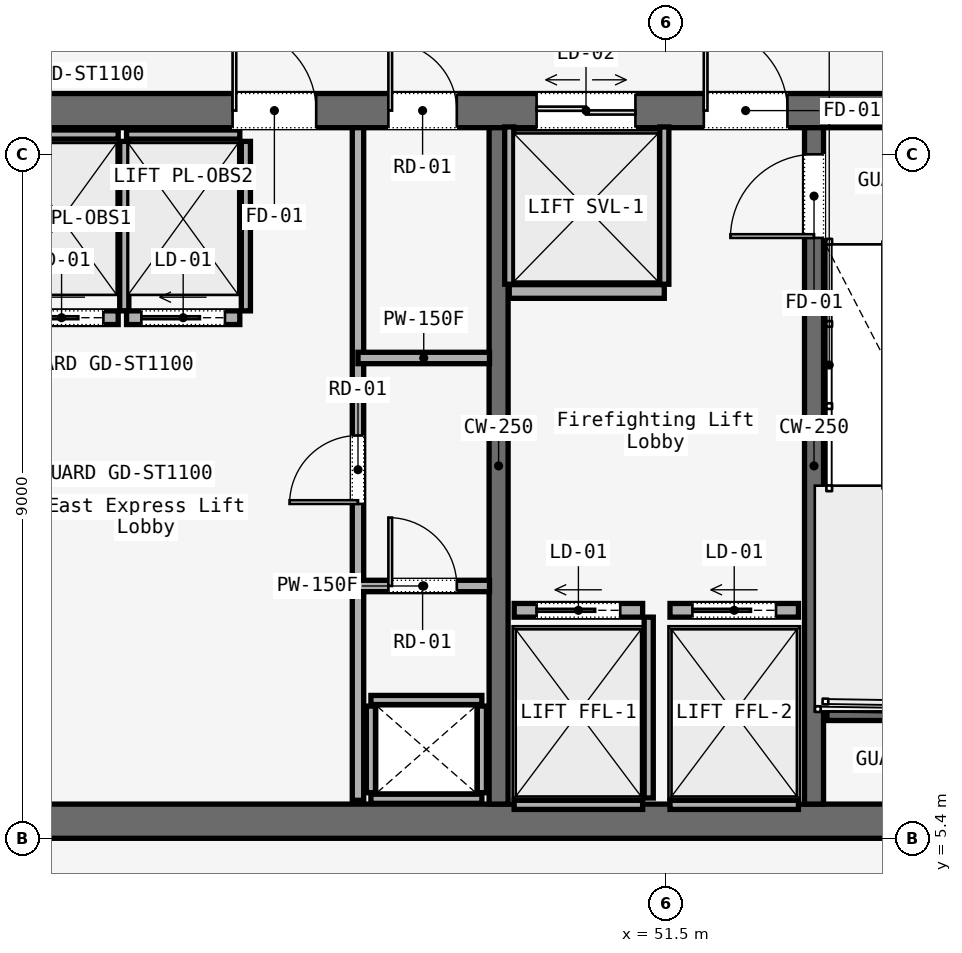
"""IFC4 building model, lengths in metres.
Left out: names, types, materials, properties, quantities, classifications, styles, units other than length and angle.
Written with IfcOpenShell. Run it as: python <this file> out.ifc"""

import sys

from ifc_helpers import new_model, si_unit, direction, frame, frame_2d, origin, place, context, subcontext, project, spatial, rectangle, extrude, element, fill, save


model = new_model("IFC4")
c1 = context("Model", 3, precision=1e-05, world=origin(), true_north=direction((0.0, 1.0)))
c2 = subcontext(c1, "Body", "Model", "MODEL_VIEW")
j1 = project(units=[si_unit("LENGTHUNIT", "METRE"), si_unit("PLANEANGLEUNIT", "RADIAN")], contexts=[c1])
p1 = place(None, origin())
s1 = spatial("IfcSite", under=j1, at=p1, CompositionType="ELEMENT")
p2 = place(p1, origin())
s2 = spatial("IfcBuilding", under=s1, at=p2, CompositionType="ELEMENT")
p3 = place(p2, frame((0.0, 0.0, -4.5)))
s3 = spatial("IfcBuildingStorey", under=s2, at=p3, CompositionType="ELEMENT", Elevation=-4.5)
p4 = place(p3, frame((26.45, 14.975, 0.0), z_axis=(0.0, 0.0, 1.0), x_axis=(1.0, 0.0, 0.0)))
e1 = element("IfcWall", 1, at=p4, inside=s3, PredefinedType="SOLIDWALL", context=c2, shape_type="SweptSolid", body=[
    extrude(rectangle(XDim=31.1, YDim=0.45, at=frame_2d((15.55, 0.0))), origin(), (0.0, 0.0, 1.0), 4.1),
])
p5 = place(p4, frame((1.65, 0.0, 0.0)))
e2 = element("IfcOpeningElement", 2, at=p5, cuts=e1, PredefinedType="OPENING", context=c2, shape_type="SweptSolid", body=[
    extrude(rectangle(XDim=1.1, YDim=2.2, at=frame_2d((0.55, 1.1))), frame((0.0, 0.225, 0.0), z_axis=(0.0, -1.0, 0.0), x_axis=(1.0, 0.0, 0.0)), (0.0, 0.0, 1.0), 0.45),
])
p6 = place(p4, frame((13.65, 0.0, 0.0)))
e3 = element("IfcOpeningElement", 3, at=p6, cuts=e1, PredefinedType="OPENING", context=c2, shape_type="SweptSolid", body=[
    extrude(rectangle(XDim=1.1, YDim=2.2, at=frame_2d((0.55, 1.1))), frame((0.0, 0.225, 0.0), z_axis=(0.0, -1.0, 0.0), x_axis=(1.0, 0.0, 0.0)), (0.0, 0.0, 1.0), 0.45),
])
p7 = place(p4, frame((25.55, 0.0, 0.0)))
e4 = element("IfcOpeningElement", 4, at=p7, cuts=e1, PredefinedType="OPENING", context=c2, shape_type="SweptSolid", body=[
    extrude(rectangle(XDim=1.1, YDim=2.2, at=frame_2d((0.55, 1.1))), frame((0.0, 0.225, 0.0), z_axis=(0.0, -1.0, 0.0), x_axis=(1.0, 0.0, 0.0)), (0.0, 0.0, 1.0), 0.45),
])
p8 = place(p4, frame((10.7, 0.0, 0.0)))
e5 = element("IfcOpeningElement", 5, at=p8, cuts=e1, PredefinedType="OPENING", context=c2, shape_type="SweptSolid", body=[
    extrude(rectangle(XDim=1.4, YDim=2.2, at=frame_2d((0.7, 1.1))), frame((0.0, 0.225, 0.0), z_axis=(0.0, -1.0, 0.0), x_axis=(1.0, 0.0, 0.0)), (0.0, 0.0, 1.0), 0.45),
])
p9 = place(p4, frame((19.35, 0.0, 0.0)))
e6 = element("IfcOpeningElement", 6, at=p9, cuts=e1, PredefinedType="OPENING", context=c2, shape_type="SweptSolid", body=[
    extrude(rectangle(XDim=1.1, YDim=2.2, at=frame_2d((0.55, 1.1))), frame((0.0, 0.225, 0.0), z_axis=(0.0, -1.0, 0.0), x_axis=(1.0, 0.0, 0.0)), (0.0, 0.0, 1.0), 0.45),
])
p10 = place(p4, frame((21.4, 0.0, 0.0)))
e7 = element("IfcOpeningElement", 7, at=p10, cuts=e1, PredefinedType="OPENING", context=c2, shape_type="SweptSolid", body=[
    extrude(rectangle(XDim=0.9, YDim=2.1, at=frame_2d((0.45, 1.05))), frame((0.0, 0.225, 0.0), z_axis=(0.0, -1.0, 0.0), x_axis=(1.0, 0.0, 0.0)), (0.0, 0.0, 1.0), 0.45),
])
p11 = place(p4, frame((23.35, 0.0, 0.0)))
e8 = element("IfcOpeningElement", 8, at=p11, cuts=e1, PredefinedType="OPENING", context=c2, shape_type="SweptSolid", body=[
    extrude(rectangle(XDim=1.3, YDim=2.3, at=frame_2d((0.65, 1.15))), frame((0.0, 0.225, 0.0), z_axis=(0.0, -1.0, 0.0), x_axis=(1.0, 0.0, 0.0)), (0.0, 0.0, 1.0), 0.45),
])
p12 = place(p3, frame((26.45, 5.625, 0.0), z_axis=(0.0, 0.0, 1.0), x_axis=(1.0, 0.0, 0.0)))
e9 = element("IfcWall", 9, at=p12, inside=s3, PredefinedType="SOLIDWALL", context=c2, shape_type="SweptSolid", body=[
    extrude(rectangle(XDim=31.1, YDim=0.45, at=frame_2d((15.55, 0.0))), origin(), (0.0, 0.0, 1.0), 4.1),
])
p13 = place(p3, frame((49.3, 5.85, 0.0), z_axis=(0.0, 0.0, 1.0), x_axis=(0.0, 1.0, 0.0)))
e10 = element("IfcWall", 10, at=p13, inside=s3, PredefinedType="SOLIDWALL", context=c2, shape_type="SweptSolid", body=[
    extrude(rectangle(XDim=8.9, YDim=0.25, at=frame_2d((4.45, 0.0))), origin(), (0.0, 0.0, 1.0), 4.1),
])
p14 = place(p3, frame((53.45, 5.85, 0.0), z_axis=(0.0, 0.0, 1.0), x_axis=(0.0, 1.0, 0.0)))
e11 = element("IfcWall", 11, at=p14, inside=s3, PredefinedType="SOLIDWALL", context=c2, shape_type="SweptSolid", body=[
    extrude(rectangle(XDim=8.9, YDim=0.25, at=frame_2d((4.45, 0.0))), origin(), (0.0, 0.0, 1.0), 4.1),
])
p15 = place(p14, frame((7.45, 0.0, 0.0)))
e12 = element("IfcOpeningElement", 12, at=p15, cuts=e11, PredefinedType="OPENING", context=c2, shape_type="SweptSolid", body=[
    extrude(rectangle(XDim=1.1, YDim=2.2, at=frame_2d((0.55, 1.1))), frame((0.0, 0.125, 0.0), z_axis=(0.0, -1.0, 0.0), x_axis=(1.0, 0.0, 0.0)), (0.0, 0.0, 1.0), 0.25),
])
p16 = place(p3, frame((53.62, 7.05, 0.0), z_axis=(0.0, 0.0, 1.0), x_axis=(1.0, 0.0, 0.0)))
e13 = element("IfcWall", 13, at=p16, inside=s3, PredefinedType="SOLIDWALL", context=c2, shape_type="SweptSolid", body=[
    extrude(rectangle(XDim=3.115, YDim=0.2, at=frame_2d((1.558, 0.0))), origin(), (0.0, 0.0, 1.0), 4.5),
])
for number, where, z_axis, x_axis in (
    (14, (47.62, 5.92, 0.0), (0.0, 0.0, 1.0), (1.0, 0.0, 0.0)),
    (15, (47.62, 7.22, 0.0), (0.0, 0.0, 1.0), (1.0, 0.0, 0.0)),
):
    element("IfcWall", number, at=place(p3, frame(where, z_axis=z_axis, x_axis=x_axis)), inside=s3, PredefinedType="SOLIDWALL", context=c2, shape_type="SweptSolid", body=[
        extrude(rectangle(XDim=1.46, YDim=0.12, at=frame_2d((0.73, 0.0))), origin(), (0.0, 0.0, 1.0), 3.143),
    ])
for number, where, z_axis, x_axis in (
    (16, (47.62, 6.0, 0.0), (0.0, 0.0, 1.0), (0.0, 1.0, 0.0)),
    (17, (49.08, 6.0, 0.0), (0.0, 0.0, 1.0), (0.0, 1.0, 0.0)),
):
    element("IfcWall", number, at=place(p3, frame(where, z_axis=z_axis, x_axis=x_axis)), inside=s3, PredefinedType="SOLIDWALL", context=c2, shape_type="SweptSolid", body=[
        extrude(rectangle(XDim=1.14, YDim=0.12, at=frame_2d((0.57, 0.0))), origin(), (0.0, 0.0, 1.0), 3.143),
    ])
p17 = place(p3, frame((47.45, 5.9, 0.0), z_axis=(0.0, 0.0, 1.0), x_axis=(0.0, 1.0, 0.0)))
e18 = element("IfcWall", 18, at=p17, inside=s3, PredefinedType="PARTITIONING", context=c2, shape_type="SweptSolid", body=[
    extrude(rectangle(XDim=8.85, YDim=0.15, at=frame_2d((4.425, 0.0))), origin(), (0.0, 0.0, 1.0), 3.143),
])
p18 = place(p17, frame((3.9, 0.0, 0.0)))
e19 = element("IfcOpeningElement", 19, at=p18, cuts=e18, PredefinedType="OPENING", context=c2, shape_type="SweptSolid", body=[
    extrude(rectangle(XDim=0.9, YDim=2.1, at=frame_2d((0.45, 1.05))), frame((0.0, 0.075, 0.0), z_axis=(0.0, -1.0, 0.0), x_axis=(1.0, 0.0, 0.0)), (0.0, 0.0, 1.0), 0.15),
])
p19 = place(p3, frame((47.45, 8.72, 0.0), z_axis=(0.0, 0.0, 1.0), x_axis=(1.0, 0.0, 0.0)))
e20 = element("IfcWall", 20, at=p19, inside=s3, PredefinedType="PARTITIONING", context=c2, shape_type="SweptSolid", body=[
    extrude(rectangle(XDim=1.73, YDim=0.15, at=frame_2d((0.865, 0.0))), origin(), (0.0, 0.0, 1.0), 3.143),
])
p20 = place(p19, frame((0.4, 0.0, 0.0)))
e21 = element("IfcOpeningElement", 21, at=p20, cuts=e20, PredefinedType="OPENING", context=c2, shape_type="SweptSolid", body=[
    extrude(rectangle(XDim=0.9, YDim=2.1, at=frame_2d((0.45, 1.05))), frame((0.0, 0.075, 0.0), z_axis=(0.0, -1.0, 0.0), x_axis=(1.0, 0.0, 0.0)), (0.0, 0.0, 1.0), 0.15),
])
p21 = place(p3, frame((47.45, 11.72, 0.0), z_axis=(0.0, 0.0, 1.0), x_axis=(1.0, 0.0, 0.0)))
e22 = element("IfcWall", 22, at=p21, inside=s3, PredefinedType="PARTITIONING", context=c2, shape_type="SweptSolid", body=[
    extrude(rectangle(XDim=1.73, YDim=0.15, at=frame_2d((0.865, 0.0))), origin(), (0.0, 0.0, 1.0), 3.143),
])
p22 = place(p3, frame((42.805, 12.25, 0.0), z_axis=(0.0, 0.0, 1.0), x_axis=(1.0, 0.0, 0.0)))
e23 = element("IfcWall", 23, at=p22, inside=s3, PredefinedType="SOLIDWALL", context=c2, shape_type="SweptSolid", body=[
    extrude(rectangle(XDim=1.49, YDim=0.18, at=frame_2d((0.745, 0.0))), origin(), (0.0, 0.0, 1.0), 3.143),
])
p23 = place(p22, frame((0.195, 0.0, 0.0)))
e24 = element("IfcOpeningElement", 24, at=p23, cuts=e23, PredefinedType="OPENING", context=c2, shape_type="SweptSolid", body=[
    extrude(rectangle(XDim=1.1, YDim=2.2, at=frame_2d((0.55, 1.1))), frame((0.0, 0.09, 0.0), z_axis=(0.0, -1.0, 0.0), x_axis=(1.0, 0.0, 0.0)), (0.0, 0.0, 1.0), 0.18),
])
p24 = place(p3, frame((42.805, 14.66, 0.0), z_axis=(0.0, 0.0, 1.0), x_axis=(1.0, 0.0, 0.0)))
e25 = element("IfcWall", 25, at=p24, inside=s3, PredefinedType="SOLIDWALL", context=c2, shape_type="SweptSolid", body=[
    extrude(rectangle(XDim=1.49, YDim=0.12, at=frame_2d((0.745, 0.0))), origin(), (0.0, 0.0, 1.0), 3.143),
])
p25 = place(p3, frame((44.375, 12.34, 0.0), z_axis=(0.0, 0.0, 1.0), x_axis=(0.0, 1.0, 0.0)))
e26 = element("IfcWall", 26, at=p25, inside=s3, PredefinedType="SOLIDWALL", context=c2, shape_type="SweptSolid", body=[
    extrude(rectangle(XDim=2.23, YDim=0.12, at=frame_2d((1.115, 0.0))), origin(), (0.0, 0.0, 1.0), 3.143),
])
p26 = place(p3, frame((44.405, 12.25, 0.0), z_axis=(0.0, 0.0, 1.0), x_axis=(1.0, 0.0, 0.0)))
e27 = element("IfcWall", 27, at=p26, inside=s3, PredefinedType="SOLIDWALL", context=c2, shape_type="SweptSolid", body=[
    extrude(rectangle(XDim=1.49, YDim=0.18, at=frame_2d((0.745, 0.0))), origin(), (0.0, 0.0, 1.0), 3.143),
])
p27 = place(p26, frame((0.195, 0.0, 0.0)))
e28 = element("IfcOpeningElement", 28, at=p27, cuts=e27, PredefinedType="OPENING", context=c2, shape_type="SweptSolid", body=[
    extrude(rectangle(XDim=1.1, YDim=2.2, at=frame_2d((0.55, 1.1))), frame((0.0, 0.09, 0.0), z_axis=(0.0, -1.0, 0.0), x_axis=(1.0, 0.0, 0.0)), (0.0, 0.0, 1.0), 0.18),
])
p28 = place(p3, frame((44.405, 14.66, 0.0), z_axis=(0.0, 0.0, 1.0), x_axis=(1.0, 0.0, 0.0)))
e29 = element("IfcWall", 29, at=p28, inside=s3, PredefinedType="SOLIDWALL", context=c2, shape_type="SweptSolid", body=[
    extrude(rectangle(XDim=1.49, YDim=0.12, at=frame_2d((0.745, 0.0))), origin(), (0.0, 0.0, 1.0), 3.143),
])
p29 = place(p3, frame((45.975, 12.34, 0.0), z_axis=(0.0, 0.0, 1.0), x_axis=(0.0, 1.0, 0.0)))
e30 = element("IfcWall", 30, at=p29, inside=s3, PredefinedType="SOLIDWALL", context=c2, shape_type="SweptSolid", body=[
    extrude(rectangle(XDim=2.23, YDim=0.12, at=frame_2d((1.115, 0.0))), origin(), (0.0, 0.0, 1.0), 3.143),
])
p30 = place(p3, frame((49.505, 8.4, 0.0), z_axis=(0.0, 0.0, 1.0), x_axis=(1.0, 0.0, 0.0)))
e31 = element("IfcWall", 31, at=p30, inside=s3, PredefinedType="SOLIDWALL", context=c2, shape_type="SweptSolid", body=[
    extrude(rectangle(XDim=1.69, YDim=0.18, at=frame_2d((0.845, 0.0))), origin(), (0.0, 0.0, 1.0), 3.143),
])
p31 = place(p30, frame((0.295, 0.0, 0.0)))
e32 = element("IfcOpeningElement", 32, at=p31, cuts=e31, PredefinedType="OPENING", context=c2, shape_type="SweptSolid", body=[
    extrude(rectangle(XDim=1.1, YDim=2.2, at=frame_2d((0.55, 1.1))), frame((0.0, 0.09, 0.0), z_axis=(0.0, -1.0, 0.0), x_axis=(1.0, 0.0, 0.0)), (0.0, 0.0, 1.0), 0.18),
])
p32 = place(p3, frame((49.505, 5.84, 0.0), z_axis=(0.0, 0.0, 1.0), x_axis=(1.0, 0.0, 0.0)))
e33 = element("IfcWall", 33, at=p32, inside=s3, PredefinedType="SOLIDWALL", context=c2, shape_type="SweptSolid", body=[
    extrude(rectangle(XDim=1.69, YDim=0.12, at=frame_2d((0.845, 0.0))), origin(), (0.0, 0.0, 1.0), 3.143),
])
p33 = place(p3, frame((51.275, 5.93, 0.0), z_axis=(0.0, 0.0, 1.0), x_axis=(0.0, 1.0, 0.0)))
e34 = element("IfcWall", 34, at=p33, inside=s3, PredefinedType="SOLIDWALL", context=c2, shape_type="SweptSolid", body=[
    extrude(rectangle(XDim=2.38, YDim=0.12, at=frame_2d((1.19, 0.0))), origin(), (0.0, 0.0, 1.0), 3.143),
])
p34 = place(p3, frame((51.555, 8.4, 0.0), z_axis=(0.0, 0.0, 1.0), x_axis=(1.0, 0.0, 0.0)))
e35 = element("IfcWall", 35, at=p34, inside=s3, PredefinedType="SOLIDWALL", context=c2, shape_type="SweptSolid", body=[
    extrude(rectangle(XDim=1.69, YDim=0.18, at=frame_2d((0.845, 0.0))), origin(), (0.0, 0.0, 1.0), 3.143),
])
p35 = place(p34, frame((0.295, 0.0, 0.0)))
e36 = element("IfcOpeningElement", 36, at=p35, cuts=e35, PredefinedType="OPENING", context=c2, shape_type="SweptSolid", body=[
    extrude(rectangle(XDim=1.1, YDim=2.2, at=frame_2d((0.55, 1.1))), frame((0.0, 0.09, 0.0), z_axis=(0.0, -1.0, 0.0), x_axis=(1.0, 0.0, 0.0)), (0.0, 0.0, 1.0), 0.18),
])
p36 = place(p3, frame((51.555, 5.84, 0.0), z_axis=(0.0, 0.0, 1.0), x_axis=(1.0, 0.0, 0.0)))
e37 = element("IfcWall", 37, at=p36, inside=s3, PredefinedType="SOLIDWALL", context=c2, shape_type="SweptSolid", body=[
    extrude(rectangle(XDim=1.69, YDim=0.12, at=frame_2d((0.845, 0.0))), origin(), (0.0, 0.0, 1.0), 3.143),
])
p37 = place(p3, frame((49.44, 12.595, 0.0), z_axis=(0.0, 0.0, 1.0), x_axis=(1.0, 0.0, 0.0)))
e38 = element("IfcWall", 38, at=p37, inside=s3, PredefinedType="SOLIDWALL", context=c2, shape_type="SweptSolid", body=[
    extrude(rectangle(XDim=2.04, YDim=0.18, at=frame_2d((1.02, 0.0))), origin(), (0.0, 0.0, 1.0), 3.143),
])
for number, where, z_axis, x_axis in (
    (39, (49.44, 12.69, 0.0), (0.0, 0.0, 1.0), (0.0, 1.0, 0.0)),
    (40, (51.48, 12.69, 0.0), (0.0, 0.0, 1.0), (0.0, 1.0, 0.0)),
):
    element("IfcWall", number, at=place(p3, frame(where, z_axis=z_axis, x_axis=x_axis)), inside=s3, PredefinedType="SOLIDWALL", context=c2, shape_type="SweptSolid", body=[
        extrude(rectangle(XDim=2.07, YDim=0.12, at=frame_2d((1.035, 0.0))), origin(), (0.0, 0.0, 1.0), 3.143),
    ])
p38 = place(p7, origin())
e41 = element("IfcDoor", 41, at=p38, inside=s3, OperationType="SINGLE_SWING_RIGHT", PredefinedType="DOOR", context=c2, shape_type="SweptSolid", body=[
    extrude(rectangle(XDim=1.1, YDim=2.2, at=frame_2d((0.55, 1.1))), frame((0.0, 0.025, 0.0), z_axis=(0.0, -1.0, 0.0), x_axis=(1.0, 0.0, 0.0)), (0.0, 0.0, 1.0), 0.05),
])
fill(e4, e41)
p39 = place(p9, origin())
e42 = element("IfcDoor", 42, at=p39, inside=s3, OperationType="SINGLE_SWING_LEFT", PredefinedType="DOOR", context=c2, shape_type="SweptSolid", body=[
    extrude(rectangle(XDim=1.1, YDim=2.2, at=frame_2d((0.55, 1.1))), frame((0.0, 0.025, 0.0), z_axis=(0.0, -1.0, 0.0), x_axis=(1.0, 0.0, 0.0)), (0.0, 0.0, 1.0), 0.05),
])
fill(e6, e42)
p40 = place(p10, origin())
e43 = element("IfcDoor", 43, at=p40, inside=s3, OperationType="SINGLE_SWING_LEFT", PredefinedType="DOOR", context=c2, shape_type="SweptSolid", body=[
    extrude(rectangle(XDim=0.9, YDim=2.1, at=frame_2d((0.45, 1.05))), frame((0.0, 0.025, 0.0), z_axis=(0.0, -1.0, 0.0), x_axis=(1.0, 0.0, 0.0)), (0.0, 0.0, 1.0), 0.05),
])
fill(e7, e43)
p41 = place(p15, origin())
e44 = element("IfcDoor", 44, at=p41, inside=s3, OperationType="SINGLE_SWING_LEFT", PredefinedType="DOOR", context=c2, shape_type="SweptSolid", body=[
    extrude(rectangle(XDim=1.1, YDim=2.2, at=frame_2d((0.55, 1.1))), frame((0.0, 0.025, 0.0), z_axis=(0.0, -1.0, 0.0), x_axis=(1.0, 0.0, 0.0)), (0.0, 0.0, 1.0), 0.05),
])
fill(e12, e44)
p42 = place(p18, origin())
e45 = element("IfcDoor", 45, at=p42, inside=s3, OperationType="SINGLE_SWING_LEFT", PredefinedType="DOOR", context=c2, shape_type="SweptSolid", body=[
    extrude(rectangle(XDim=0.9, YDim=2.1, at=frame_2d((0.45, 1.05))), frame((0.0, 0.025, 0.0), z_axis=(0.0, -1.0, 0.0), x_axis=(1.0, 0.0, 0.0)), (0.0, 0.0, 1.0), 0.05),
])
fill(e19, e45)
p43 = place(p20, origin())
e46 = element("IfcDoor", 46, at=p43, inside=s3, OperationType="SINGLE_SWING_RIGHT", PredefinedType="DOOR", context=c2, shape_type="SweptSolid", body=[
    extrude(rectangle(XDim=0.9, YDim=2.1, at=frame_2d((0.45, 1.05))), frame((0.0, 0.025, 0.0), z_axis=(0.0, -1.0, 0.0), x_axis=(1.0, 0.0, 0.0)), (0.0, 0.0, 1.0), 0.05),
])
fill(e21, e46)
p44 = place(p23, origin())
e47 = element("IfcDoor", 47, at=p44, inside=s3, OperationType="SLIDING_TO_LEFT", PredefinedType="DOOR", context=c2, shape_type="SweptSolid", body=[
    extrude(rectangle(XDim=1.1, YDim=2.2, at=frame_2d((0.55, 1.1))), frame((0.0, 0.025, 0.0), z_axis=(0.0, -1.0, 0.0), x_axis=(1.0, 0.0, 0.0)), (0.0, 0.0, 1.0), 0.05),
])
fill(e24, e47)
p45 = place(p27, origin())
e48 = element("IfcDoor", 48, at=p45, inside=s3, OperationType="SLIDING_TO_LEFT", PredefinedType="DOOR", context=c2, shape_type="SweptSolid", body=[
    extrude(rectangle(XDim=1.1, YDim=2.2, at=frame_2d((0.55, 1.1))), frame((0.0, 0.025, 0.0), z_axis=(0.0, -1.0, 0.0), x_axis=(1.0, 0.0, 0.0)), (0.0, 0.0, 1.0), 0.05),
])
fill(e28, e48)
p46 = place(p31, origin())
e49 = element("IfcDoor", 49, at=p46, inside=s3, OperationType="SLIDING_TO_LEFT", PredefinedType="DOOR", context=c2, shape_type="SweptSolid", body=[
    extrude(rectangle(XDim=1.1, YDim=2.2, at=frame_2d((0.55, 1.1))), frame((0.0, 0.025, 0.0), z_axis=(0.0, -1.0, 0.0), x_axis=(1.0, 0.0, 0.0)), (0.0, 0.0, 1.0), 0.05),
])
fill(e32, e49)
p47 = place(p35, origin())
e50 = element("IfcDoor", 50, at=p47, inside=s3, OperationType="SLIDING_TO_LEFT", PredefinedType="DOOR", context=c2, shape_type="SweptSolid", body=[
    extrude(rectangle(XDim=1.1, YDim=2.2, at=frame_2d((0.55, 1.1))), frame((0.0, 0.025, 0.0), z_axis=(0.0, -1.0, 0.0), x_axis=(1.0, 0.0, 0.0)), (0.0, 0.0, 1.0), 0.05),
])
fill(e36, e50)
p48 = place(p11, origin())
e51 = element("IfcDoor", 51, at=p48, inside=s3, OperationType="DOUBLE_DOOR_SLIDING", PredefinedType="DOOR", context=c2, shape_type="SweptSolid", body=[
    extrude(rectangle(XDim=1.3, YDim=2.3, at=frame_2d((0.65, 1.15))), frame((0.0, 0.025, 0.0), z_axis=(0.0, -1.0, 0.0), x_axis=(1.0, 0.0, 0.0)), (0.0, 0.0, 1.0), 0.05),
])
fill(e8, e51)
save(model, sys.argv[1])
